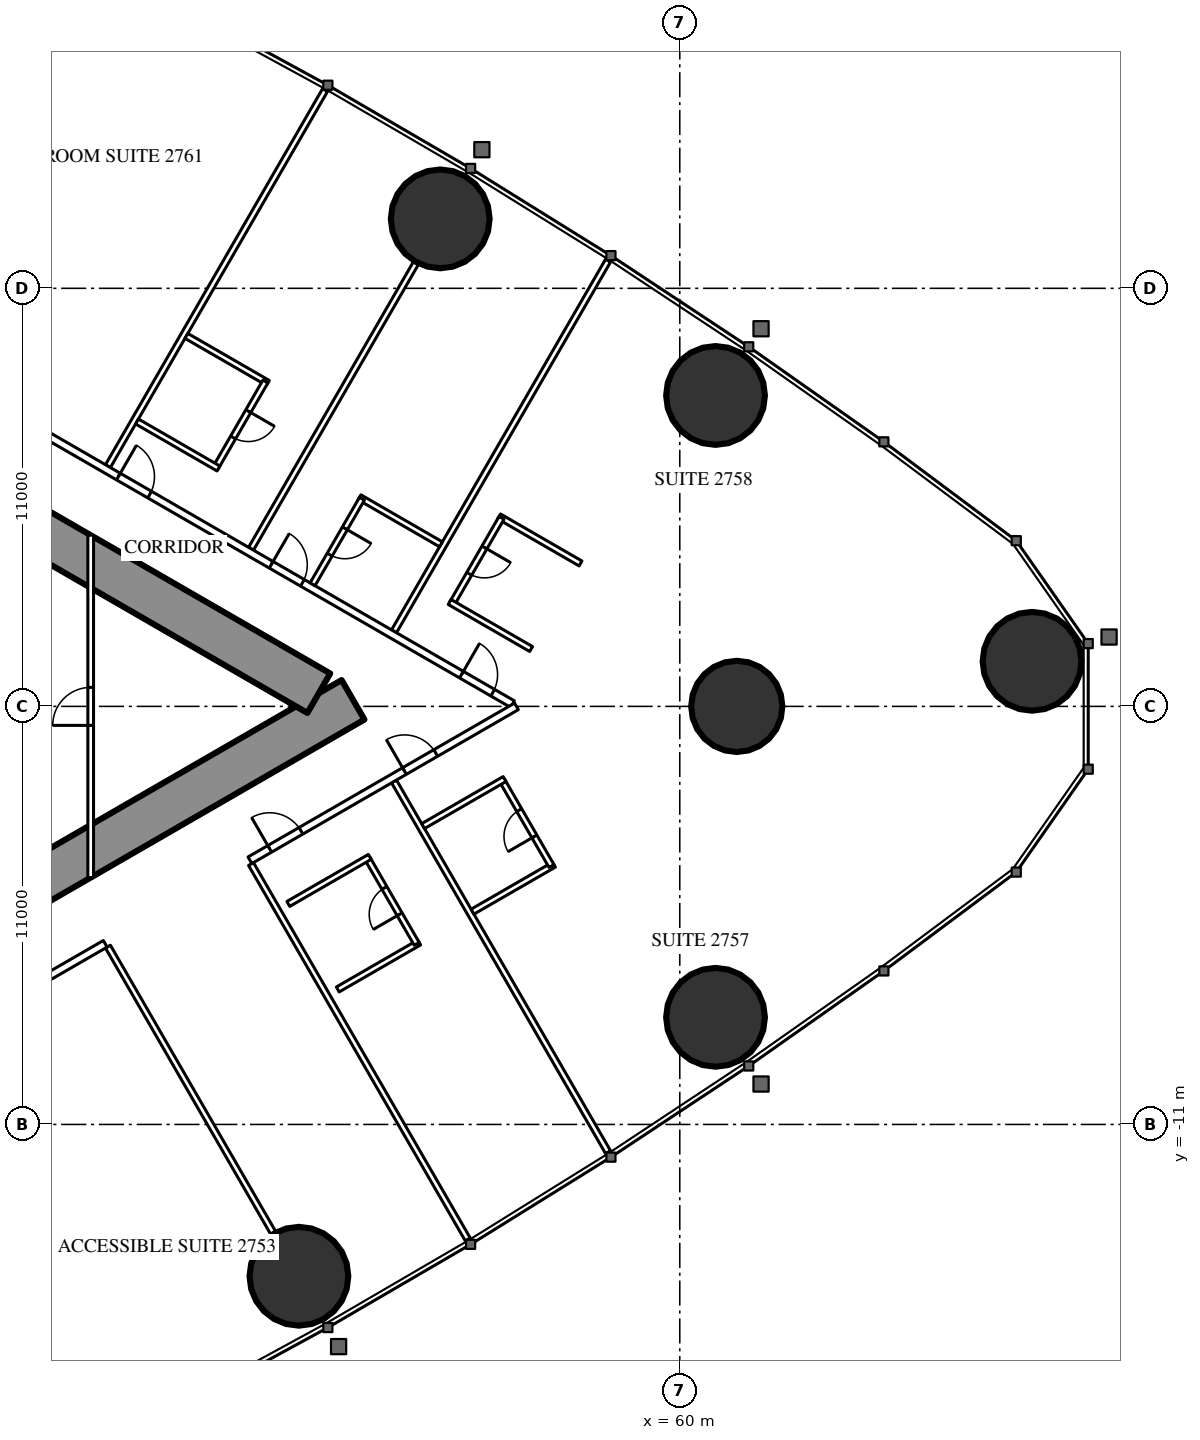
"""IFC4 building model, lengths in metres.
Left out: names, types, materials, properties, quantities, classifications, styles, units other than length and angle.
Written with IfcOpenShell. Run it as: python <this file> out.ifc"""

import sys

from ifc_helpers import new_model, si_unit, direction, frame, frame_2d, origin, origin_2d, place, context, subcontext, project, spatial, rectangle, circle, hollow_circle, extrude, element, fill, save


model = new_model("IFC4")
c1 = context("Model", 3, precision=1e-05, world=origin(), true_north=direction((0.0, 1.0)))
c2 = subcontext(c1, "Body", "Model", "MODEL_VIEW")
j1 = project(units=[si_unit("LENGTHUNIT", "METRE"), si_unit("PLANEANGLEUNIT", "RADIAN")], contexts=[c1])
p1 = place(None, origin())
s1 = spatial("IfcSite", under=j1, at=p1, CompositionType="ELEMENT")
p2 = place(p1, origin())
s2 = spatial("IfcBuilding", under=s1, at=p2, CompositionType="ELEMENT")
p3 = place(p2, frame((0.0, 0.0, 104.6)))
s3 = spatial("IfcBuildingStorey", under=s2, at=p3, CompositionType="ELEMENT", Elevation=104.6)
for number, where, z_axis, x_axis in (
    (1, (69.269, 1.187, 0.0), (0.0, 0.0, 1.0), (1.0, 0.0, 0.0)),
    (2, (60.941, 8.181, 0.0), (0.0, 0.0, 1.0), (1.0, 0.0, 0.0)),
    (3, (53.697, 12.827, 0.0), (0.0, 0.0, 1.0), (1.0, 0.0, 0.0)),
    (4, (49.979, -14.994, 0.0), (0.0, 0.0, 1.0), (1.0, 0.0, 0.0)),
    (5, (60.941, -8.181, 0.0), (0.0, 0.0, 1.0), (1.0, 0.0, 0.0)),
):
    element("IfcColumn", number, at=place(p3, frame(where, z_axis=z_axis, x_axis=x_axis)), inside=s3, PredefinedType="COLUMN", context=c2, shape_type="SweptSolid", body=[
        extrude(hollow_circle(Radius=1.3, WallThickness=0.1, at=origin_2d()), origin(), (0.0, 0.0, 1.0), 3.5),
    ])
p4 = place(p3, frame((61.5, 0.0, 0.0), z_axis=(0.0, 0.0, 1.0), x_axis=(1.0, 0.0, 0.0)))
e6 = element("IfcColumn", 6, at=p4, inside=s3, PredefinedType="COLUMN", context=c2, shape_type="SweptSolid", body=[
    extrude(circle(Radius=1.2, at=origin_2d()), origin(), (0.0, 0.0, 1.0), 3.5),
])
p5 = place(p3, frame((27.2, -13.8, 0.0), z_axis=(0.0, 0.0, 1.0), x_axis=(0.866027159892, 0.499996958321, 0.0)))
e7 = element("IfcWall", 7, at=p5, inside=s3, PredefinedType="SHEAR", context=c2, shape_type="SweptSolid", body=[
    extrude(rectangle(XDim=27.947, YDim=1.2, at=frame_2d((13.973, 0.0))), origin(), (0.0, 0.0, 1.0), 3.5),
])
p6 = place(p5, frame((4.6, 0.0, 0.0)))
e8 = element("IfcOpeningElement", 8, at=p6, cuts=e7, PredefinedType="OPENING", context=c2, shape_type="SweptSolid", body=[
    extrude(rectangle(XDim=1.0, YDim=2.2, at=frame_2d((0.5, 1.1))), frame((0.0, 0.61, 0.0), z_axis=(0.0, -1.0, 0.0), x_axis=(1.0, 0.0, 0.0)), (0.0, 0.0, 1.0), 1.22),
])
p7 = place(p5, frame((13.395, 0.0, 0.0)))
e9 = element("IfcOpeningElement", 9, at=p7, cuts=e7, PredefinedType="OPENING", context=c2, shape_type="SweptSolid", body=[
    extrude(rectangle(XDim=1.8, YDim=2.2, at=frame_2d((0.9, 1.1))), frame((0.0, 0.61, 0.0), z_axis=(0.0, -1.0, 0.0), x_axis=(1.0, 0.0, 0.0)), (0.0, 0.0, 1.0), 1.22),
])
p8 = place(p3, frame((27.2, 13.8, 0.0), z_axis=(0.0, 0.0, 1.0), x_axis=(0.866024515034, -0.500001539357, 0.0)))
e10 = element("IfcWall", 10, at=p8, inside=s3, PredefinedType="SHEAR", context=c2, shape_type="SweptSolid", body=[
    extrude(rectangle(XDim=26.907, YDim=1.2, at=frame_2d((13.454, 0.0))), origin(), (0.0, 0.0, 1.0), 3.5),
])
p9 = place(p8, frame((4.6, 0.0, 0.0)))
e11 = element("IfcOpeningElement", 11, at=p9, cuts=e10, PredefinedType="OPENING", context=c2, shape_type="SweptSolid", body=[
    extrude(rectangle(XDim=1.0, YDim=2.2, at=frame_2d((0.5, 1.1))), frame((0.0, 0.61, 0.0), z_axis=(0.0, -1.0, 0.0), x_axis=(1.0, 0.0, 0.0)), (0.0, 0.0, 1.0), 1.22),
])
p10 = place(p8, frame((13.395, 0.0, 0.0)))
e12 = element("IfcOpeningElement", 12, at=p10, cuts=e10, PredefinedType="OPENING", context=c2, shape_type="SweptSolid", body=[
    extrude(rectangle(XDim=1.8, YDim=2.2, at=frame_2d((0.9, 1.1))), frame((0.0, 0.61, 0.0), z_axis=(0.0, -1.0, 0.0), x_axis=(1.0, 0.0, 0.0)), (0.0, 0.0, 1.0), 1.22),
])
p11 = place(p3, frame((44.954, -6.321, 0.0), z_axis=(0.0, 0.0, 1.0), x_axis=(0.500018676722, -0.866014620505, 0.0)))
e13 = element("IfcWall", 13, at=p11, inside=s3, PredefinedType="PARTITIONING", context=c2, shape_type="SweptSolid", body=[
    extrude(rectangle(XDim=8.704, YDim=0.15, at=frame_2d((4.352, 0.0))), origin(), (0.0, 0.0, 1.0), 2.2),
])
p12 = place(p3, frame((48.719, -4.147, 0.0), z_axis=(0.0, 0.0, 1.0), x_axis=(0.499990498062, -0.866030889661, 0.0)))
e14 = element("IfcWall", 14, at=p12, inside=s3, PredefinedType="PARTITIONING", context=c2, shape_type="SweptSolid", body=[
    extrude(rectangle(XDim=11.406, YDim=0.15, at=frame_2d((5.703, 0.0))), origin(), (0.0, 0.0, 1.0), 3.25),
])
p13 = place(p3, frame((52.481, -1.975, 0.0), z_axis=(0.0, 0.0, 1.0), x_axis=(0.500003867771, -0.866023170714, 0.0)))
e15 = element("IfcWall", 15, at=p13, inside=s3, PredefinedType="PARTITIONING", context=c2, shape_type="SweptSolid", body=[
    extrude(rectangle(XDim=11.265, YDim=0.15, at=frame_2d((5.632, 0.0))), origin(), (0.0, 0.0, 1.0), 3.25),
])
p14 = place(p3, frame((44.954, 6.321, 0.0), z_axis=(0.0, 0.0, 1.0), x_axis=(0.500009815811, 0.866019736549, 0.0)))
e16 = element("IfcWall", 16, at=p14, inside=s3, PredefinedType="PARTITIONING", context=c2, shape_type="SweptSolid", body=[
    extrude(rectangle(XDim=11.424, YDim=0.15, at=frame_2d((5.712, 0.0))), origin(), (0.0, 0.0, 1.0), 3.25),
])
p15 = place(p3, frame((48.719, 4.147, 0.0), z_axis=(0.0, 0.0, 1.0), x_axis=(0.499993328235, 0.866029255696, 0.0)))
e17 = element("IfcWall", 17, at=p15, inside=s3, PredefinedType="PARTITIONING", context=c2, shape_type="SweptSolid", body=[
    extrude(rectangle(XDim=8.686, YDim=0.15, at=frame_2d((4.343, 0.0))), origin(), (0.0, 0.0, 1.0), 2.2),
])
p16 = place(p3, frame((52.481, 1.975, 0.0), z_axis=(0.0, 0.0, 1.0), x_axis=(0.500003867771, 0.866023170714, 0.0)))
e18 = element("IfcWall", 18, at=p16, inside=s3, PredefinedType="PARTITIONING", context=c2, shape_type="SweptSolid", body=[
    extrude(rectangle(XDim=11.265, YDim=0.15, at=frame_2d((5.632, 0.0))), origin(), (0.0, 0.0, 1.0), 3.25),
])
p17 = place(p3, frame((36.834, 10.894, 0.0), z_axis=(0.0, 0.0, 1.0), x_axis=(0.866028157229, -0.499995230863, 0.0)))
e19 = element("IfcWall", 19, at=p17, inside=s3, PredefinedType="PARTITIONING", context=c2, shape_type="SweptSolid", body=[
    extrude(rectangle(XDim=21.667, YDim=0.2, at=frame_2d((10.833, 0.0))), origin(), (0.0, 0.0, 1.0), 3.25),
])
p18 = place(p17, frame((20.117, 0.0, 0.0)))
e20 = element("IfcOpeningElement", 20, at=p18, cuts=e19, PredefinedType="OPENING", context=c2, shape_type="SweptSolid", body=[
    extrude(rectangle(XDim=0.95, YDim=2.2, at=frame_2d((0.475, 1.1))), frame((0.0, 0.11, 0.0), z_axis=(0.0, -1.0, 0.0), x_axis=(1.0, 0.0, 0.0)), (0.0, 0.0, 1.0), 0.22),
])
p19 = place(p17, frame((14.335, 0.0, 0.0)))
e21 = element("IfcOpeningElement", 21, at=p19, cuts=e19, PredefinedType="OPENING", context=c2, shape_type="SweptSolid", body=[
    extrude(rectangle(XDim=0.95, YDim=2.2, at=frame_2d((0.475, 1.1))), frame((0.0, 0.11, 0.0), z_axis=(0.0, -1.0, 0.0), x_axis=(1.0, 0.0, 0.0)), (0.0, 0.0, 1.0), 0.22),
])
p20 = place(p17, frame((9.693, 0.0, 0.0)))
e22 = element("IfcOpeningElement", 22, at=p20, cuts=e19, PredefinedType="OPENING", context=c2, shape_type="SweptSolid", body=[
    extrude(rectangle(XDim=0.95, YDim=2.2, at=frame_2d((0.475, 1.1))), frame((0.0, 0.11, 0.0), z_axis=(0.0, -1.0, 0.0), x_axis=(1.0, 0.0, 0.0)), (0.0, 0.0, 1.0), 0.22),
])
p21 = place(p17, frame((2.95, 0.0, 0.0)))
e23 = element("IfcOpeningElement", 23, at=p21, cuts=e19, PredefinedType="OPENING", context=c2, shape_type="SweptSolid", body=[
    extrude(rectangle(XDim=0.95, YDim=2.2, at=frame_2d((0.475, 1.1))), frame((0.0, 0.11, 0.0), z_axis=(0.0, -1.0, 0.0), x_axis=(1.0, 0.0, 0.0)), (0.0, 0.0, 1.0), 0.22),
])
p22 = place(p3, frame((37.96, -10.243, 0.0), z_axis=(0.0, 0.0, 1.0), x_axis=(0.86603350054, 0.499985975746, 0.0)))
e24 = element("IfcWall", 24, at=p22, inside=s3, PredefinedType="PARTITIONING", context=c2, shape_type="SweptSolid", body=[
    extrude(rectangle(XDim=7.993, YDim=0.2, at=frame_2d((3.997, 0.0))), origin(), (0.0, 0.0, 1.0), 3.25),
])
p23 = place(p22, frame((3.35, 0.0, 0.0)))
e25 = element("IfcOpeningElement", 25, at=p23, cuts=e24, PredefinedType="OPENING", context=c2, shape_type="SweptSolid", body=[
    extrude(rectangle(XDim=1.0, YDim=2.2, at=frame_2d((0.5, 1.1))), frame((0.0, 0.11, 0.0), z_axis=(0.0, -1.0, 0.0), x_axis=(1.0, 0.0, 0.0)), (0.0, 0.0, 1.0), 0.22),
])
p24 = place(p3, frame((48.69, -4.048, 0.0), z_axis=(0.0, 0.0, 1.0), x_axis=(0.866026410209, 0.499998256818, 0.0)))
e26 = element("IfcWall", 26, at=p24, inside=s3, PredefinedType="PARTITIONING", context=c2, shape_type="SweptSolid", body=[
    extrude(rectangle(XDim=8.097, YDim=0.2, at=frame_2d((4.048, 0.0))), origin(), (0.0, 0.0, 1.0), 3.25),
])
p25 = place(p24, frame((0.6, 0.0, 0.0)))
e27 = element("IfcOpeningElement", 27, at=p25, cuts=e26, PredefinedType="OPENING", context=c2, shape_type="SweptSolid", body=[
    extrude(rectangle(XDim=0.95, YDim=2.2, at=frame_2d((0.475, 1.1))), frame((0.0, 0.11, 0.0), z_axis=(0.0, -1.0, 0.0), x_axis=(1.0, 0.0, 0.0)), (0.0, 0.0, 1.0), 0.22),
])
p26 = place(p24, frame((4.695, 0.0, 0.0)))
e28 = element("IfcOpeningElement", 28, at=p26, cuts=e26, PredefinedType="OPENING", context=c2, shape_type="SweptSolid", body=[
    extrude(rectangle(XDim=0.95, YDim=2.2, at=frame_2d((0.475, 1.1))), frame((0.0, 0.11, 0.0), z_axis=(0.0, -1.0, 0.0), x_axis=(1.0, 0.0, 0.0)), (0.0, 0.0, 1.0), 0.22),
])
p27 = place(p3, frame((51.0, -7.449, 0.0), z_axis=(0.0, 0.0, 1.0), x_axis=(0.866006523861, 0.500032699561, 0.0)))
e29 = element("IfcWall", 29, at=p27, inside=s3, PredefinedType="PARTITIONING", context=c2, shape_type="SweptSolid", body=[
    extrude(rectangle(XDim=2.475, YDim=0.15, at=frame_2d((1.237, 0.0))), origin(), (0.0, 0.0, 1.0), 3.25),
])
p28 = place(p3, frame((51.778, -3.998, 0.0), z_axis=(0.0, 0.0, 1.0), x_axis=(0.500047596559, -0.865997922154, 0.0)))
e30 = element("IfcWall", 30, at=p28, inside=s3, PredefinedType="PARTITIONING", context=c2, shape_type="SweptSolid", body=[
    extrude(rectangle(XDim=2.6, YDim=0.15, at=frame_2d((1.3, 0.0))), origin(), (0.0, 0.0, 1.0), 3.25),
])
p29 = place(p28, frame((0.9, 0.0, 0.0)))
e31 = element("IfcOpeningElement", 31, at=p29, cuts=e30, PredefinedType="OPENING", context=c2, shape_type="SweptSolid", body=[
    extrude(rectangle(XDim=0.8, YDim=2.2, at=frame_2d((0.4, 1.1))), frame((0.0, 0.085, 0.0), z_axis=(0.0, -1.0, 0.0), x_axis=(1.0, 0.0, 0.0)), (0.0, 0.0, 1.0), 0.17),
])
for number, where, z_axis, x_axis in (
    (32, (49.7, -5.198, 0.0), (0.0, 0.0, 1.0), (0.866, 0.5, 0.0)),
    (33, (54.546, -5.402, 0.0), (0.0, 0.0, 1.0), (0.866, 0.5, 0.0)),
):
    element("IfcWall", number, at=place(p3, frame(where, z_axis=z_axis, x_axis=x_axis)), inside=s3, PredefinedType="PARTITIONING", context=c2, shape_type="SweptSolid", body=[
        extrude(rectangle(XDim=2.475, YDim=0.15, at=frame_2d((1.237, 0.0))), origin(), (0.0, 0.0, 1.0), 3.25),
    ])
p30 = place(p3, frame((55.325, -1.95, 0.0), z_axis=(0.0, 0.0, 1.0), x_axis=(0.500006934395, -0.866021400173, 0.0)))
e34 = element("IfcWall", 34, at=p30, inside=s3, PredefinedType="PARTITIONING", context=c2, shape_type="SweptSolid", body=[
    extrude(rectangle(XDim=2.6, YDim=0.15, at=frame_2d((1.3, 0.0))), origin(), (0.0, 0.0, 1.0), 3.25),
])
p31 = place(p30, frame((0.9, 0.0, 0.0)))
e35 = element("IfcOpeningElement", 35, at=p31, cuts=e34, PredefinedType="OPENING", context=c2, shape_type="SweptSolid", body=[
    extrude(rectangle(XDim=0.8, YDim=2.2, at=frame_2d((0.4, 1.1))), frame((0.0, 0.085, 0.0), z_axis=(0.0, -1.0, 0.0), x_axis=(1.0, 0.0, 0.0)), (0.0, 0.0, 1.0), 0.17),
])
for number, where, z_axis, x_axis in (
    (36, (53.246, -3.15, 0.0), (0.0, 0.0, 1.0), (0.866, 0.5, 0.0)),
    (37, (55.245, 4.998, 0.0), (0.0, 0.0, 1.0), (0.866, -0.5, 0.0)),
):
    element("IfcWall", number, at=place(p3, frame(where, z_axis=z_axis, x_axis=x_axis)), inside=s3, PredefinedType="PARTITIONING", context=c2, shape_type="SweptSolid", body=[
        extrude(rectangle(XDim=2.475, YDim=0.15, at=frame_2d((1.237, 0.0))), origin(), (0.0, 0.0, 1.0), 3.25),
    ])
p32 = place(p3, frame((54.01, 2.709, 0.0), z_axis=(0.0, 0.0, 1.0), x_axis=(0.500006934395, 0.866021400173, 0.0)))
e38 = element("IfcWall", 38, at=p32, inside=s3, PredefinedType="PARTITIONING", context=c2, shape_type="SweptSolid", body=[
    extrude(rectangle(XDim=2.6, YDim=0.15, at=frame_2d((1.3, 0.0))), origin(), (0.0, 0.0, 1.0), 3.25),
])
p33 = place(p32, frame((0.9, 0.0, 0.0)))
e39 = element("IfcOpeningElement", 39, at=p33, cuts=e38, PredefinedType="OPENING", context=c2, shape_type="SweptSolid", body=[
    extrude(rectangle(XDim=0.8, YDim=2.2, at=frame_2d((0.4, 1.1))), frame((0.0, 0.085, 0.0), z_axis=(0.0, -1.0, 0.0), x_axis=(1.0, 0.0, 0.0)), (0.0, 0.0, 1.0), 0.17),
])
p34 = place(p3, frame((53.945, 2.747, 0.0), z_axis=(0.0, 0.0, 1.0), x_axis=(0.866031185235, -0.4999899861, 0.0)))
e40 = element("IfcWall", 40, at=p34, inside=s3, PredefinedType="PARTITIONING", context=c2, shape_type="SweptSolid", body=[
    extrude(rectangle(XDim=2.475, YDim=0.15, at=frame_2d((1.238, 0.0))), origin(), (0.0, 0.0, 1.0), 3.25),
])
p35 = place(p3, frame((51.573, 5.502, 0.0), z_axis=(0.0, 0.0, 1.0), x_axis=(0.866006523861, -0.500032699561, 0.0)))
e41 = element("IfcWall", 41, at=p35, inside=s3, PredefinedType="PARTITIONING", context=c2, shape_type="SweptSolid", body=[
    extrude(rectangle(XDim=2.475, YDim=0.15, at=frame_2d((1.237, 0.0))), origin(), (0.0, 0.0, 1.0), 3.25),
])
p36 = place(p3, frame((50.338, 3.213, 0.0), z_axis=(0.0, 0.0, 1.0), x_axis=(0.500047596559, 0.865997922154, 0.0)))
e42 = element("IfcWall", 42, at=p36, inside=s3, PredefinedType="PARTITIONING", context=c2, shape_type="SweptSolid", body=[
    extrude(rectangle(XDim=2.6, YDim=0.15, at=frame_2d((1.3, 0.0))), origin(), (0.0, 0.0, 1.0), 3.25),
])
p37 = place(p36, frame((0.9, 0.0, 0.0)))
e43 = element("IfcOpeningElement", 43, at=p37, cuts=e42, PredefinedType="OPENING", context=c2, shape_type="SweptSolid", body=[
    extrude(rectangle(XDim=0.8, YDim=2.2, at=frame_2d((0.4, 1.1))), frame((0.0, 0.085, 0.0), z_axis=(0.0, -1.0, 0.0), x_axis=(1.0, 0.0, 0.0)), (0.0, 0.0, 1.0), 0.17),
])
p38 = place(p3, frame((47.019, 9.748, 0.0), z_axis=(0.0, 0.0, 1.0), x_axis=(0.866006523861, -0.500032699561, 0.0)))
e44 = element("IfcWall", 44, at=p38, inside=s3, PredefinedType="PARTITIONING", context=c2, shape_type="SweptSolid", body=[
    extrude(rectangle(XDim=2.475, YDim=0.15, at=frame_2d((1.237, 0.0))), origin(), (0.0, 0.0, 1.0), 3.25),
])
p39 = place(p3, frame((47.797, 6.296, 0.0), z_axis=(0.0, 0.0, 1.0), x_axis=(0.499936506574, 0.866062058628, 0.0)))
e45 = element("IfcWall", 45, at=p39, inside=s3, PredefinedType="PARTITIONING", context=c2, shape_type="SweptSolid", body=[
    extrude(rectangle(XDim=2.6, YDim=0.15, at=frame_2d((1.3, 0.0))), origin(), (0.0, 0.0, 1.0), 3.25),
])
p40 = place(p39, frame((0.9, 0.0, 0.0)))
e46 = element("IfcOpeningElement", 46, at=p40, cuts=e45, PredefinedType="OPENING", context=c2, shape_type="SweptSolid", body=[
    extrude(rectangle(XDim=0.8, YDim=2.2, at=frame_2d((0.4, 1.1))), frame((0.0, 0.085, 0.0), z_axis=(0.0, -1.0, 0.0), x_axis=(1.0, 0.0, 0.0)), (0.0, 0.0, 1.0), 0.17),
])
p41 = place(p3, frame((45.719, 7.496, 0.0), z_axis=(0.0, 0.0, 1.0), x_axis=(0.866031185235, -0.4999899861, 0.0)))
e47 = element("IfcWall", 47, at=p41, inside=s3, PredefinedType="PARTITIONING", context=c2, shape_type="SweptSolid", body=[
    extrude(rectangle(XDim=2.475, YDim=0.15, at=frame_2d((1.238, 0.0))), origin(), (0.0, 0.0, 1.0), 3.25),
])
p42 = place(p3, frame((44.5, -4.505, 0.0), z_axis=(0.0, 0.0, 1.0), x_axis=(0.0, 1.0, 0.0)))
e48 = element("IfcWall", 48, at=p42, inside=s3, PredefinedType="PARTITIONING", context=c2, shape_type="SweptSolid", body=[
    extrude(rectangle(XDim=9.009, YDim=0.15, at=frame_2d((4.505, 0.0))), origin(), (0.0, 0.0, 1.0), 2.45),
])
p43 = place(p42, frame((4.005, 0.0, 0.0)))
e49 = element("IfcOpeningElement", 49, at=p43, cuts=e48, PredefinedType="OPENING", context=c2, shape_type="SweptSolid", body=[
    extrude(rectangle(XDim=1.0, YDim=2.2, at=frame_2d((0.5, 1.1))), frame((0.0, 0.085, 0.0), z_axis=(0.0, -1.0, 0.0), x_axis=(1.0, 0.0, 0.0)), (0.0, 0.0, 1.0), 0.17),
])
p44 = place(p29, origin())
e50 = element("IfcDoor", 50, at=p44, inside=s3, OperationType="SINGLE_SWING_RIGHT", PredefinedType="DOOR", context=c2, shape_type="SweptSolid", body=[
    extrude(rectangle(XDim=0.8, YDim=2.2, at=frame_2d((0.4, 1.1))), frame((0.0, 0.025, 0.0), z_axis=(0.0, -1.0, 0.0), x_axis=(1.0, 0.0, 0.0)), (0.0, 0.0, 1.0), 0.05),
])
fill(e31, e50)
p45 = place(p25, origin())
e51 = element("IfcDoor", 51, at=p45, inside=s3, OperationType="SINGLE_SWING_LEFT", PredefinedType="DOOR", context=c2, shape_type="SweptSolid", body=[
    extrude(rectangle(XDim=0.95, YDim=2.2, at=frame_2d((0.475, 1.1))), frame((0.0, 0.025, 0.0), z_axis=(0.0, -1.0, 0.0), x_axis=(1.0, 0.0, 0.0)), (0.0, 0.0, 1.0), 0.05),
])
fill(e27, e51)
p46 = place(p31, origin())
e52 = element("IfcDoor", 52, at=p46, inside=s3, OperationType="SINGLE_SWING_RIGHT", PredefinedType="DOOR", context=c2, shape_type="SweptSolid", body=[
    extrude(rectangle(XDim=0.8, YDim=2.2, at=frame_2d((0.4, 1.1))), frame((0.0, 0.025, 0.0), z_axis=(0.0, -1.0, 0.0), x_axis=(1.0, 0.0, 0.0)), (0.0, 0.0, 1.0), 0.05),
])
fill(e35, e52)
p47 = place(p26, origin())
e53 = element("IfcDoor", 53, at=p47, inside=s3, OperationType="SINGLE_SWING_LEFT", PredefinedType="DOOR", context=c2, shape_type="SweptSolid", body=[
    extrude(rectangle(XDim=0.95, YDim=2.2, at=frame_2d((0.475, 1.1))), frame((0.0, 0.025, 0.0), z_axis=(0.0, -1.0, 0.0), x_axis=(1.0, 0.0, 0.0)), (0.0, 0.0, 1.0), 0.05),
])
fill(e28, e53)
p48 = place(p33, origin())
e54 = element("IfcDoor", 54, at=p48, inside=s3, OperationType="SINGLE_SWING_RIGHT", PredefinedType="DOOR", context=c2, shape_type="SweptSolid", body=[
    extrude(rectangle(XDim=0.8, YDim=2.2, at=frame_2d((0.4, 1.1))), frame((0.0, 0.025, 0.0), z_axis=(0.0, -1.0, 0.0), x_axis=(1.0, 0.0, 0.0)), (0.0, 0.0, 1.0), 0.05),
])
fill(e39, e54)
p49 = place(p18, origin())
e55 = element("IfcDoor", 55, at=p49, inside=s3, OperationType="SINGLE_SWING_LEFT", PredefinedType="DOOR", context=c2, shape_type="SweptSolid", body=[
    extrude(rectangle(XDim=0.95, YDim=2.2, at=frame_2d((0.475, 1.1))), frame((0.0, 0.025, 0.0), z_axis=(0.0, -1.0, 0.0), x_axis=(1.0, 0.0, 0.0)), (0.0, 0.0, 1.0), 0.05),
])
fill(e20, e55)
p50 = place(p37, origin())
e56 = element("IfcDoor", 56, at=p50, inside=s3, OperationType="SINGLE_SWING_RIGHT", PredefinedType="DOOR", context=c2, shape_type="SweptSolid", body=[
    extrude(rectangle(XDim=0.8, YDim=2.2, at=frame_2d((0.4, 1.1))), frame((0.0, 0.025, 0.0), z_axis=(0.0, -1.0, 0.0), x_axis=(1.0, 0.0, 0.0)), (0.0, 0.0, 1.0), 0.05),
])
fill(e43, e56)
p51 = place(p19, origin())
e57 = element("IfcDoor", 57, at=p51, inside=s3, OperationType="SINGLE_SWING_LEFT", PredefinedType="DOOR", context=c2, shape_type="SweptSolid", body=[
    extrude(rectangle(XDim=0.95, YDim=2.2, at=frame_2d((0.475, 1.1))), frame((0.0, 0.025, 0.0), z_axis=(0.0, -1.0, 0.0), x_axis=(1.0, 0.0, 0.0)), (0.0, 0.0, 1.0), 0.05),
])
fill(e21, e57)
p52 = place(p40, origin())
e58 = element("IfcDoor", 58, at=p52, inside=s3, OperationType="SINGLE_SWING_RIGHT", PredefinedType="DOOR", context=c2, shape_type="SweptSolid", body=[
    extrude(rectangle(XDim=0.8, YDim=2.2, at=frame_2d((0.4, 1.1))), frame((0.0, 0.025, 0.0), z_axis=(0.0, -1.0, 0.0), x_axis=(1.0, 0.0, 0.0)), (0.0, 0.0, 1.0), 0.05),
])
fill(e46, e58)
p53 = place(p20, origin())
e59 = element("IfcDoor", 59, at=p53, inside=s3, OperationType="SINGLE_SWING_LEFT", PredefinedType="DOOR", context=c2, shape_type="SweptSolid", body=[
    extrude(rectangle(XDim=0.95, YDim=2.2, at=frame_2d((0.475, 1.1))), frame((0.0, 0.025, 0.0), z_axis=(0.0, -1.0, 0.0), x_axis=(1.0, 0.0, 0.0)), (0.0, 0.0, 1.0), 0.05),
])
fill(e22, e59)
p54 = place(p43, origin())
e60 = element("IfcDoor", 60, at=p54, inside=s3, OperationType="SINGLE_SWING_LEFT", PredefinedType="DOOR", context=c2, shape_type="SweptSolid", body=[
    extrude(rectangle(XDim=1.0, YDim=2.2, at=frame_2d((0.5, 1.1))), frame((0.0, 0.025, 0.0), z_axis=(0.0, -1.0, 0.0), x_axis=(1.0, 0.0, 0.0)), (0.0, 0.0, 1.0), 0.05),
])
fill(e49, e60)
save(model, sys.argv[1])
